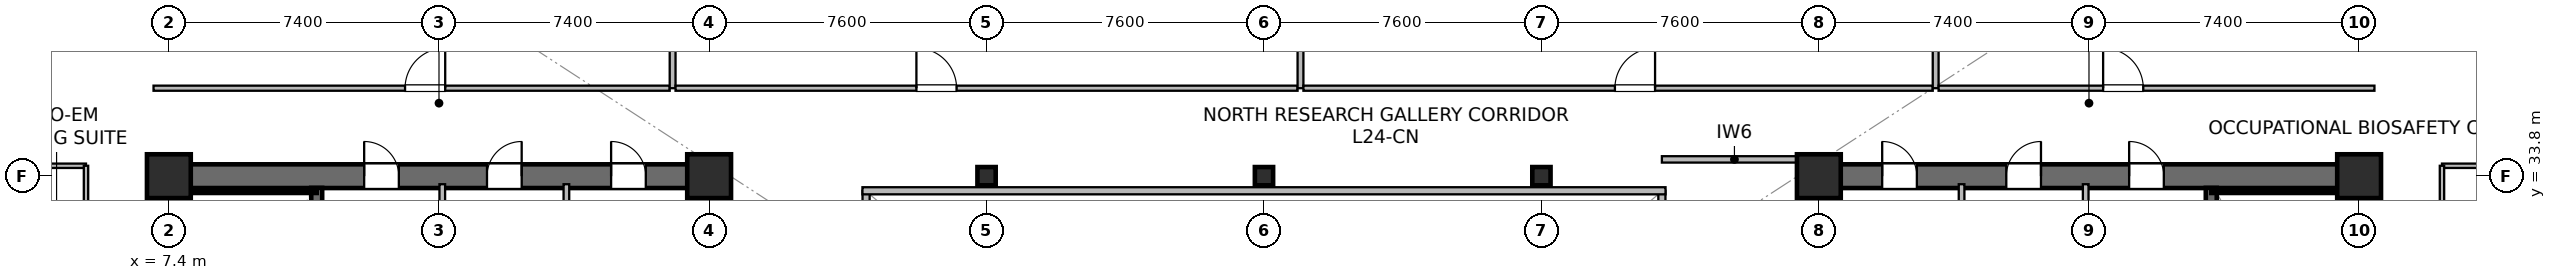
"""IFC4 building model, lengths in metres.
Left out: names, types, materials, properties, quantities, classifications, styles, units other than length and angle.
Written with IfcOpenShell. Run it as: python <this file> out.ifc"""

import sys

from ifc_helpers import new_model, si_unit, direction, frame, frame_2d, origin, origin_2d, place, context, subcontext, project, spatial, rectangle, hollow_rectangle, extrude, source, transform, mapped, element, fill, save


model = new_model("IFC4")
c1 = context("Model", 3, precision=1e-05, world=origin(), true_north=direction((0.0, 1.0)))
c2 = subcontext(c1, "Body", "Model", "MODEL_VIEW")
j1 = project(units=[si_unit("LENGTHUNIT", "METRE"), si_unit("PLANEANGLEUNIT", "RADIAN")], contexts=[c1])
p1 = place(None, origin())
s1 = spatial("IfcSite", under=j1, at=p1, CompositionType="ELEMENT")
p2 = place(p1, origin())
s2 = spatial("IfcBuilding", under=s1, at=p2, CompositionType="ELEMENT")
p3 = place(p2, frame((0.0, 0.0, 100.3)))
s3 = spatial("IfcBuildingStorey", under=s2, at=p3, CompositionType="ELEMENT", Elevation=100.3)
p4 = place(p3, frame((7.075, 33.8, 0.0), z_axis=(0.0, 0.0, 1.0), x_axis=(1.0, 0.0, 0.0)))
e1 = element("IfcWall", 1, at=p4, inside=s3, PredefinedType="SHEAR", context=c2, shape_type="SweptSolid", body=[
    extrude(rectangle(XDim=15.45, YDim=0.65, at=frame_2d((7.725, 0.0))), origin(), (0.0, 0.0, 1.0), 4.49),
])
p5 = place(p4, frame((5.675, 0.0, 0.0)))
e2 = element("IfcOpeningElement", 2, at=p5, cuts=e1, PredefinedType="OPENING", context=c2, shape_type="SweptSolid", body=[
    extrude(rectangle(XDim=0.95, YDim=2.15, at=frame_2d((0.475, 1.075))), frame((0.0, 0.335, 0.0), z_axis=(0.0, -1.0, 0.0), x_axis=(1.0, 0.0, 0.0)), (0.0, 0.0, 1.0), 0.67),
])
p6 = place(p4, frame((9.04, 0.0, 0.0)))
e3 = element("IfcOpeningElement", 3, at=p6, cuts=e1, PredefinedType="OPENING", context=c2, shape_type="SweptSolid", body=[
    extrude(rectangle(XDim=0.95, YDim=2.15, at=frame_2d((0.475, 1.075))), frame((0.0, 0.335, 0.0), z_axis=(0.0, -1.0, 0.0), x_axis=(1.0, 0.0, 0.0)), (0.0, 0.0, 1.0), 0.67),
])
p7 = place(p4, frame((12.44, 0.0, 0.0)))
e4 = element("IfcOpeningElement", 4, at=p7, cuts=e1, PredefinedType="OPENING", context=c2, shape_type="SweptSolid", body=[
    extrude(rectangle(XDim=0.95, YDim=2.15, at=frame_2d((0.475, 1.075))), frame((0.0, 0.335, 0.0), z_axis=(0.0, -1.0, 0.0), x_axis=(1.0, 0.0, 0.0)), (0.0, 0.0, 1.0), 0.67),
])
p8 = place(p3, frame((7.4, 15.125, 0.0), z_axis=(0.0, 0.0, 1.0), x_axis=(0.0, 1.0, 0.0)))
e5 = element("IfcWall", 5, at=p8, inside=s3, PredefinedType="SHEAR", context=c2, shape_type="SweptSolid", body=[
    extrude(rectangle(XDim=18.35, YDim=0.65, at=frame_2d((9.175, 0.0))), origin(), (0.0, 0.0, 1.0), 4.49),
])
p9 = place(p3, frame((22.2, 15.125, 0.0), z_axis=(0.0, 0.0, 1.0), x_axis=(0.0, 1.0, 0.0)))
e6 = element("IfcWall", 6, at=p9, inside=s3, PredefinedType="SHEAR", context=c2, shape_type="SweptSolid", body=[
    extrude(rectangle(XDim=18.35, YDim=0.65, at=frame_2d((9.175, 0.0))), origin(), (0.0, 0.0, 1.0), 4.49),
])
p10 = place(p9, frame((3.425, 0.0, 0.0)))
e7 = element("IfcOpeningElement", 7, at=p10, cuts=e6, PredefinedType="OPENING", context=c2, shape_type="SweptSolid", body=[
    extrude(rectangle(XDim=1.42, YDim=2.2, at=frame_2d((0.71, 1.1))), frame((0.0, 0.335, 0.0), z_axis=(0.0, -1.0, 0.0), x_axis=(1.0, 0.0, 0.0)), (0.0, 0.0, 1.0), 0.67),
])
p11 = place(p3, frame((11.45, 24.85, 0.0), z_axis=(0.0, 0.0, 1.0), x_axis=(0.0, 1.0, 0.0)))
e8 = element("IfcWall", 8, at=p11, inside=s3, PredefinedType="SHEAR", context=c2, shape_type="SweptSolid", body=[
    extrude(rectangle(XDim=8.63, YDim=0.3, at=frame_2d((4.315, 0.0))), origin(), (0.0, 0.0, 1.0), 4.49),
])
p12 = place(p11, frame((0.42, 0.0, 0.0)))
e9 = element("IfcOpeningElement", 9, at=p12, cuts=e8, PredefinedType="OPENING", context=c2, shape_type="SweptSolid", body=[
    extrude(rectangle(XDim=1.1, YDim=2.15, at=frame_2d((0.55, 1.075))), frame((0.0, 0.16, 0.0), z_axis=(0.0, -1.0, 0.0), x_axis=(1.0, 0.0, 0.0)), (0.0, 0.0, 1.0), 0.32),
])
p13 = place(p3, frame((7.73, 33.4, 0.0), z_axis=(0.0, 0.0, 1.0), x_axis=(1.0, 0.0, 0.0)))
e10 = element("IfcWall", 10, at=p13, inside=s3, PredefinedType="SOLIDWALL", context=c2, shape_type="SweptSolid", body=[
    extrude(rectangle(XDim=3.72, YDim=0.12, at=frame_2d((1.86, 0.0))), origin(), (0.0, 0.0, 1.0), 4.49),
])
p14 = place(p3, frame((7.73, 25.0, 0.0), z_axis=(0.0, 0.0, 1.0), x_axis=(0.0, 1.0, 0.0)))
e11 = element("IfcWall", 11, at=p14, inside=s3, PredefinedType="SOLIDWALL", context=c2, shape_type="SweptSolid", body=[
    extrude(rectangle(XDim=8.32, YDim=0.12, at=frame_2d((4.16, 0.0))), origin(), (0.0, 0.0, 1.0), 4.49),
])
p15 = place(p3, frame((52.275, 33.8, 0.0), z_axis=(0.0, 0.0, 1.0), x_axis=(1.0, 0.0, 0.0)))
e12 = element("IfcWall", 12, at=p15, inside=s3, PredefinedType="SHEAR", context=c2, shape_type="SweptSolid", body=[
    extrude(rectangle(XDim=15.45, YDim=0.65, at=frame_2d((7.725, 0.0))), origin(), (0.0, 0.0, 1.0), 4.49),
])
p16 = place(p15, frame((8.825, 0.0, 0.0)))
e13 = element("IfcOpeningElement", 13, at=p16, cuts=e12, PredefinedType="OPENING", context=c2, shape_type="SweptSolid", body=[
    extrude(rectangle(XDim=0.95, YDim=2.15, at=frame_2d((0.475, 1.075))), frame((0.0, 0.335, 0.0), z_axis=(0.0, -1.0, 0.0), x_axis=(1.0, 0.0, 0.0)), (0.0, 0.0, 1.0), 0.67),
])
p17 = place(p15, frame((5.46, 0.0, 0.0)))
e14 = element("IfcOpeningElement", 14, at=p17, cuts=e12, PredefinedType="OPENING", context=c2, shape_type="SweptSolid", body=[
    extrude(rectangle(XDim=0.95, YDim=2.15, at=frame_2d((0.475, 1.075))), frame((0.0, 0.335, 0.0), z_axis=(0.0, -1.0, 0.0), x_axis=(1.0, 0.0, 0.0)), (0.0, 0.0, 1.0), 0.67),
])
p18 = place(p15, frame((2.06, 0.0, 0.0)))
e15 = element("IfcOpeningElement", 15, at=p18, cuts=e12, PredefinedType="OPENING", context=c2, shape_type="SweptSolid", body=[
    extrude(rectangle(XDim=0.95, YDim=2.15, at=frame_2d((0.475, 1.075))), frame((0.0, 0.335, 0.0), z_axis=(0.0, -1.0, 0.0), x_axis=(1.0, 0.0, 0.0)), (0.0, 0.0, 1.0), 0.67),
])
p19 = place(p3, frame((52.6, 15.125, 0.0), z_axis=(0.0, 0.0, 1.0), x_axis=(0.0, 1.0, 0.0)))
e16 = element("IfcWall", 16, at=p19, inside=s3, PredefinedType="SHEAR", context=c2, shape_type="SweptSolid", body=[
    extrude(rectangle(XDim=18.35, YDim=0.65, at=frame_2d((9.175, 0.0))), origin(), (0.0, 0.0, 1.0), 4.49),
])
p20 = place(p19, frame((3.425, 0.0, 0.0)))
e17 = element("IfcOpeningElement", 17, at=p20, cuts=e16, PredefinedType="OPENING", context=c2, shape_type="SweptSolid", body=[
    extrude(rectangle(XDim=1.42, YDim=2.2, at=frame_2d((0.71, 1.1))), frame((0.0, 0.335, 0.0), z_axis=(0.0, -1.0, 0.0), x_axis=(1.0, 0.0, 0.0)), (0.0, 0.0, 1.0), 0.67),
])
p21 = place(p3, frame((67.4, 15.125, 0.0), z_axis=(0.0, 0.0, 1.0), x_axis=(0.0, 1.0, 0.0)))
e18 = element("IfcWall", 18, at=p21, inside=s3, PredefinedType="SHEAR", context=c2, shape_type="SweptSolid", body=[
    extrude(rectangle(XDim=18.35, YDim=0.65, at=frame_2d((9.175, 0.0))), origin(), (0.0, 0.0, 1.0), 4.49),
])
p22 = place(p3, frame((63.35, 24.85, 0.0), z_axis=(0.0, 0.0, 1.0), x_axis=(0.0, 1.0, 0.0)))
e19 = element("IfcWall", 19, at=p22, inside=s3, PredefinedType="SHEAR", context=c2, shape_type="SweptSolid", body=[
    extrude(rectangle(XDim=8.63, YDim=0.3, at=frame_2d((4.315, 0.0))), origin(), (0.0, 0.0, 1.0), 4.49),
])
p23 = place(p22, frame((0.42, 0.0, 0.0)))
e20 = element("IfcOpeningElement", 20, at=p23, cuts=e19, PredefinedType="OPENING", context=c2, shape_type="SweptSolid", body=[
    extrude(rectangle(XDim=1.1, YDim=2.15, at=frame_2d((0.55, 1.075))), frame((0.0, 0.16, 0.0), z_axis=(0.0, -1.0, 0.0), x_axis=(1.0, 0.0, 0.0)), (0.0, 0.0, 1.0), 0.32),
])
p24 = place(p3, frame((63.35, 33.4, 0.0), z_axis=(0.0, 0.0, 1.0), x_axis=(1.0, 0.0, 0.0)))
e21 = element("IfcWall", 21, at=p24, inside=s3, PredefinedType="SOLIDWALL", context=c2, shape_type="SweptSolid", body=[
    extrude(rectangle(XDim=3.72, YDim=0.12, at=frame_2d((1.86, 0.0))), origin(), (0.0, 0.0, 1.0), 4.49),
])
p25 = place(p3, frame((67.07, 25.0, 0.0), z_axis=(0.0, 0.0, 1.0), x_axis=(0.0, 1.0, 0.0)))
e22 = element("IfcWall", 22, at=p25, inside=s3, PredefinedType="SOLIDWALL", context=c2, shape_type="SweptSolid", body=[
    extrude(rectangle(XDim=8.32, YDim=0.12, at=frame_2d((4.16, 0.0))), origin(), (0.0, 0.0, 1.0), 4.49),
])
m1 = source(origin(), c2, "Body", "SweptSolid", [
    extrude(rectangle(XDim=1.2, YDim=1.2, at=origin_2d()), origin(), (0.0, 0.0, 1.0), 4.8),
])
for number, where, z_axis, x_axis in (
    (23, (7.4, 33.8, 0.0), (0.0, 0.0, 1.0), (1.0, 0.0, 0.0)),
    (24, (22.2, 33.8, 0.0), (0.0, 0.0, 1.0), (1.0, 0.0, 0.0)),
    (25, (52.6, 33.8, 0.0), (0.0, 0.0, 1.0), (1.0, 0.0, 0.0)),
    (26, (67.4, 33.8, 0.0), (0.0, 0.0, 1.0), (1.0, 0.0, 0.0)),
):
    element("IfcColumn", number, at=place(p3, frame(where, z_axis=z_axis, x_axis=x_axis)), inside=s3, PredefinedType="COLUMN", context=c2, shape_type="MappedRepresentation", body=[
        mapped(m1, transform((0.0, 0.0, 0.0), scale=1.0)),
    ])
m2 = source(origin(), c2, "Body", "SweptSolid", [
    extrude(hollow_rectangle(XDim=0.5, YDim=0.5, WallThickness=0.022, at=origin_2d()), origin(), (0.0, 0.0, 1.0), 4.8),
])
for number, where, z_axis, x_axis in (
    (27, (29.8, 33.8, 0.0), (0.0, 0.0, 1.0), (1.0, 0.0, 0.0)),
    (28, (37.4, 33.8, 0.0), (0.0, 0.0, 1.0), (1.0, 0.0, 0.0)),
    (29, (45.0, 33.8, 0.0), (0.0, 0.0, 1.0), (1.0, 0.0, 0.0)),
):
    element("IfcColumn", number, at=place(p3, frame(where, z_axis=z_axis, x_axis=x_axis)), inside=s3, PredefinedType="COLUMN", context=c2, shape_type="MappedRepresentation", body=[
        mapped(m2, transform((0.0, 0.0, 0.0), scale=1.0)),
    ])
p26 = place(p3, frame((14.89, 29.65, 0.0), z_axis=(0.0, 0.0, 1.0), x_axis=(0.0, 1.0, 0.0)))
e30 = element("IfcWall", 30, at=p26, inside=s3, PredefinedType="PLUMBINGWALL", context=c2, shape_type="SweptSolid", body=[
    extrude(rectangle(XDim=3.93, YDim=0.155, at=frame_2d((1.965, 0.0))), origin(), (0.0, 0.0, 1.0), 3.825),
])
p27 = place(p3, frame((18.29, 29.65, 0.0), z_axis=(0.0, 0.0, 1.0), x_axis=(0.0, 1.0, 0.0)))
e31 = element("IfcWall", 31, at=p27, inside=s3, PredefinedType="PLUMBINGWALL", context=c2, shape_type="SweptSolid", body=[
    extrude(rectangle(XDim=3.93, YDim=0.155, at=frame_2d((1.965, 0.0))), origin(), (0.0, 0.0, 1.0), 4.49),
])
p28 = place(p3, frame((59.91, 29.65, 0.0), z_axis=(0.0, 0.0, 1.0), x_axis=(0.0, 1.0, 0.0)))
e32 = element("IfcWall", 32, at=p28, inside=s3, PredefinedType="PLUMBINGWALL", context=c2, shape_type="SweptSolid", body=[
    extrude(rectangle(XDim=3.93, YDim=0.155, at=frame_2d((1.965, 0.0))), origin(), (0.0, 0.0, 1.0), 3.825),
])
p29 = place(p3, frame((56.51, 29.65, 0.0), z_axis=(0.0, 0.0, 1.0), x_axis=(0.0, 1.0, 0.0)))
e33 = element("IfcWall", 33, at=p29, inside=s3, PredefinedType="PLUMBINGWALL", context=c2, shape_type="SweptSolid", body=[
    extrude(rectangle(XDim=3.93, YDim=0.155, at=frame_2d((1.965, 0.0))), origin(), (0.0, 0.0, 1.0), 4.49),
])
p30 = place(p3, frame((48.3, 34.26, 0.0), z_axis=(0.0, 0.0, 1.0), x_axis=(1.0, 0.0, 0.0)))
e34 = element("IfcWall", 34, at=p30, inside=s3, PredefinedType="PARTITIONING", context=c2, shape_type="SweptSolid", body=[
    extrude(rectangle(XDim=3.975, YDim=0.175, at=frame_2d((1.987, 0.0))), origin(), (0.0, 0.0, 1.0), 4.175),
])
p31 = place(p3, frame((26.5, 15.2, 0.0), z_axis=(0.0, 0.0, 1.0), x_axis=(0.0, 1.0, 0.0)))
e35 = element("IfcWall", 35, at=p31, inside=s3, PredefinedType="SOLIDWALL", context=c2, shape_type="SweptSolid", body=[
    extrude(rectangle(XDim=18.2, YDim=0.195, at=frame_2d((9.1, 0.0))), origin(), (0.0, 0.0, 1.0), 4.49),
])
p32 = place(p31, frame((1.8, 0.0, 0.9)))
e36 = element("IfcOpeningElement", 36, at=p32, cuts=e35, PredefinedType="OPENING", context=c2, shape_type="SweptSolid", body=[
    extrude(rectangle(XDim=1.5, YDim=1.4, at=frame_2d((0.75, 0.7))), frame((0.0, 0.107, 0.0), z_axis=(0.0, -1.0, 0.0), x_axis=(1.0, 0.0, 0.0)), (0.0, 0.0, 1.0), 0.215),
])
p33 = place(p31, frame((13.2, 0.0, 0.9)))
e37 = element("IfcOpeningElement", 37, at=p33, cuts=e35, PredefinedType="OPENING", context=c2, shape_type="SweptSolid", body=[
    extrude(rectangle(XDim=1.5, YDim=1.4, at=frame_2d((0.75, 0.7))), frame((0.0, 0.107, 0.0), z_axis=(0.0, -1.0, 0.0), x_axis=(1.0, 0.0, 0.0)), (0.0, 0.0, 1.0), 0.215),
])
p34 = place(p3, frame((48.3, 15.2, 0.0), z_axis=(0.0, 0.0, 1.0), x_axis=(0.0, 1.0, 0.0)))
e38 = element("IfcWall", 38, at=p34, inside=s3, PredefinedType="SOLIDWALL", context=c2, shape_type="SweptSolid", body=[
    extrude(rectangle(XDim=18.2, YDim=0.195, at=frame_2d((9.1, 0.0))), origin(), (0.0, 0.0, 1.0), 4.49),
])
p35 = place(p34, frame((1.8, 0.0, 0.9)))
e39 = element("IfcOpeningElement", 39, at=p35, cuts=e38, PredefinedType="OPENING", context=c2, shape_type="SweptSolid", body=[
    extrude(rectangle(XDim=1.5, YDim=1.4, at=frame_2d((0.75, 0.7))), frame((0.0, 0.107, 0.0), z_axis=(0.0, -1.0, 0.0), x_axis=(1.0, 0.0, 0.0)), (0.0, 0.0, 1.0), 0.215),
])
p36 = place(p34, frame((13.2, 0.0, 0.9)))
e40 = element("IfcOpeningElement", 40, at=p36, cuts=e38, PredefinedType="OPENING", context=c2, shape_type="SweptSolid", body=[
    extrude(rectangle(XDim=1.5, YDim=1.4, at=frame_2d((0.75, 0.7))), frame((0.0, 0.107, 0.0), z_axis=(0.0, -1.0, 0.0), x_axis=(1.0, 0.0, 0.0)), (0.0, 0.0, 1.0), 0.215),
])
p37 = place(p3, frame((26.4, 33.4, 0.0), z_axis=(0.0, 0.0, 1.0), x_axis=(1.0, 0.0, 0.0)))
e41 = element("IfcWall", 41, at=p37, inside=s3, PredefinedType="SOLIDWALL", context=c2, shape_type="SweptSolid", body=[
    extrude(rectangle(XDim=22.0, YDim=0.195, at=frame_2d((11.0, 0.0))), origin(), (0.0, 0.0, 1.0), 4.49),
])
p38 = place(p3, frame((6.98, 36.21, 0.0), z_axis=(0.0, 0.0, 1.0), x_axis=(1.0, 0.0, 0.0)))
e42 = element("IfcWall", 42, at=p38, inside=s3, PredefinedType="PARTITIONING", context=c2, shape_type="SweptSolid", body=[
    extrude(rectangle(XDim=14.14, YDim=0.14, at=frame_2d((7.07, 0.0))), origin(), (0.0, 0.0, 1.0), 3.825),
])
p39 = place(p38, frame((6.89, 0.0, 0.0)))
e43 = element("IfcOpeningElement", 43, at=p39, cuts=e42, PredefinedType="OPENING", context=c2, shape_type="SweptSolid", body=[
    extrude(rectangle(XDim=1.1, YDim=2.18, at=frame_2d((0.55, 1.09))), frame((0.0, 0.08, 0.0), z_axis=(0.0, -1.0, 0.0), x_axis=(1.0, 0.0, 0.0)), (0.0, 0.0, 1.0), 0.16),
])
p40 = place(p3, frame((21.2, 36.21, 0.0), z_axis=(0.0, 0.0, 1.0), x_axis=(0.0, 1.0, 0.0)))
e44 = element("IfcWall", 44, at=p40, inside=s3, PredefinedType="PARTITIONING", context=c2, shape_type="SweptSolid", body=[
    extrude(rectangle(XDim=10.98, YDim=0.16, at=frame_2d((5.49, 0.0))), origin(), (0.0, 0.0, 1.0), 3.775),
])
p41 = place(p3, frame((21.28, 36.21, 0.0), z_axis=(0.0, 0.0, 1.0), x_axis=(1.0, 0.0, 0.0)))
e45 = element("IfcWall", 45, at=p41, inside=s3, PredefinedType="PARTITIONING", context=c2, shape_type="SweptSolid", body=[
    extrude(rectangle(XDim=17.04, YDim=0.14, at=frame_2d((8.52, 0.0))), origin(), (0.0, 0.0, 1.0), 3.825),
])
p42 = place(p41, frame((6.598, 0.0, 0.0)))
e46 = element("IfcOpeningElement", 46, at=p42, cuts=e45, PredefinedType="OPENING", context=c2, shape_type="SweptSolid", body=[
    extrude(rectangle(XDim=1.1, YDim=2.18, at=frame_2d((0.55, 1.09))), frame((0.0, 0.08, 0.0), z_axis=(0.0, -1.0, 0.0), x_axis=(1.0, 0.0, 0.0)), (0.0, 0.0, 1.0), 0.16),
])
p43 = place(p3, frame((38.4, 36.21, 0.0), z_axis=(0.0, 0.0, 1.0), x_axis=(0.0, 1.0, 0.0)))
e47 = element("IfcWall", 47, at=p43, inside=s3, PredefinedType="PARTITIONING", context=c2, shape_type="SweptSolid", body=[
    extrude(rectangle(XDim=9.78, YDim=0.16, at=frame_2d((4.89, 0.0))), origin(), (0.0, 0.0, 1.0), 3.775),
])
p44 = place(p3, frame((38.48, 36.21, 0.0), z_axis=(0.0, 0.0, 1.0), x_axis=(1.0, 0.0, 0.0)))
e48 = element("IfcWall", 48, at=p44, inside=s3, PredefinedType="PARTITIONING", context=c2, shape_type="SweptSolid", body=[
    extrude(rectangle(XDim=17.24, YDim=0.14, at=frame_2d((8.62, 0.0))), origin(), (0.0, 0.0, 1.0), 3.825),
])
p45 = place(p44, frame((8.533, 0.0, 0.0)))
e49 = element("IfcOpeningElement", 49, at=p45, cuts=e48, PredefinedType="OPENING", context=c2, shape_type="SweptSolid", body=[
    extrude(rectangle(XDim=1.1, YDim=2.18, at=frame_2d((0.55, 1.09))), frame((0.0, 0.08, 0.0), z_axis=(0.0, -1.0, 0.0), x_axis=(1.0, 0.0, 0.0)), (0.0, 0.0, 1.0), 0.16),
])
p46 = place(p3, frame((55.8, 36.21, 0.0), z_axis=(0.0, 0.0, 1.0), x_axis=(0.0, 1.0, 0.0)))
e50 = element("IfcWall", 50, at=p46, inside=s3, PredefinedType="PARTITIONING", context=c2, shape_type="SweptSolid", body=[
    extrude(rectangle(XDim=10.98, YDim=0.16, at=frame_2d((5.49, 0.0))), origin(), (0.0, 0.0, 1.0), 3.775),
])
p47 = place(p3, frame((55.88, 36.21, 0.0), z_axis=(0.0, 0.0, 1.0), x_axis=(1.0, 0.0, 0.0)))
e51 = element("IfcWall", 51, at=p47, inside=s3, PredefinedType="PARTITIONING", context=c2, shape_type="SweptSolid", body=[
    extrude(rectangle(XDim=11.94, YDim=0.14, at=frame_2d((5.97, 0.0))), origin(), (0.0, 0.0, 1.0), 3.825),
])
p48 = place(p47, frame((4.507, 0.0, 0.0)))
e52 = element("IfcOpeningElement", 52, at=p48, cuts=e51, PredefinedType="OPENING", context=c2, shape_type="SweptSolid", body=[
    extrude(rectangle(XDim=1.1, YDim=2.18, at=frame_2d((0.55, 1.09))), frame((0.0, 0.08, 0.0), z_axis=(0.0, -1.0, 0.0), x_axis=(1.0, 0.0, 0.0)), (0.0, 0.0, 1.0), 0.16),
])
p49 = place(p3, frame((2.11, 34.085, 0.0), z_axis=(0.0, 0.0, 1.0), x_axis=(1.0, 0.0, 0.0)))
e53 = element("IfcWall", 53, at=p49, inside=s3, PredefinedType="PARTITIONING", context=c2, shape_type="SweptSolid", body=[
    extrude(rectangle(XDim=3.02, YDim=0.12, at=frame_2d((1.51, 0.0))), origin(), (0.0, 0.0, 1.0), 4.49),
])
p50 = place(p3, frame((5.13, 26.26, 0.0), z_axis=(0.0, 0.0, 1.0), x_axis=(0.0, 1.0, 0.0)))
e54 = element("IfcWall", 54, at=p50, inside=s3, PredefinedType="PARTITIONING", context=c2, shape_type="SweptSolid", body=[
    extrude(rectangle(XDim=7.825, YDim=0.12, at=frame_2d((3.913, 0.0))), origin(), (0.0, 0.0, 1.0), 4.49),
])
p51 = place(p50, frame((3.462, 0.0, 0.0)))
e55 = element("IfcOpeningElement", 55, at=p51, cuts=e54, PredefinedType="OPENING", context=c2, shape_type="SweptSolid", body=[
    extrude(rectangle(XDim=0.9, YDim=2.1, at=frame_2d((0.45, 1.05))), frame((0.0, 0.07, 0.0), z_axis=(0.0, -1.0, 0.0), x_axis=(1.0, 0.0, 0.0)), (0.0, 0.0, 1.0), 0.14),
])
p52 = place(p3, frame((69.67, 34.085, 0.0), z_axis=(0.0, 0.0, 1.0), x_axis=(1.0, 0.0, 0.0)))
e56 = element("IfcWall", 56, at=p52, inside=s3, PredefinedType="PARTITIONING", context=c2, shape_type="SweptSolid", body=[
    extrude(rectangle(XDim=3.02, YDim=0.12, at=frame_2d((1.51, 0.0))), origin(), (0.0, 0.0, 1.0), 4.49),
])
p53 = place(p3, frame((69.67, 29.06, 0.0), z_axis=(0.0, 0.0, 1.0), x_axis=(0.0, 1.0, 0.0)))
e57 = element("IfcWall", 57, at=p53, inside=s3, PredefinedType="PARTITIONING", context=c2, shape_type="SweptSolid", body=[
    extrude(rectangle(XDim=5.025, YDim=0.12, at=frame_2d((2.512, 0.0))), origin(), (0.0, 0.0, 1.0), 4.49),
])
p54 = place(p53, frame((2.062, 0.0, 0.0)))
e58 = element("IfcOpeningElement", 58, at=p54, cuts=e57, PredefinedType="OPENING", context=c2, shape_type="SweptSolid", body=[
    extrude(rectangle(XDim=0.9, YDim=2.1, at=frame_2d((0.45, 1.05))), frame((0.0, 0.07, 0.0), z_axis=(0.0, -1.0, 0.0), x_axis=(1.0, 0.0, 0.0)), (0.0, 0.0, 1.0), 0.14),
])
m3 = source(origin(), c2, "Body", "SweptSolid", [
    extrude(rectangle(XDim=0.95, YDim=2.15, at=frame_2d((0.475, 1.075))), frame((0.0, 0.025, 0.0), z_axis=(0.0, -1.0, 0.0), x_axis=(1.0, 0.0, 0.0)), (0.0, 0.0, 1.0), 0.05),
])
p55 = place(p5, origin())
e59 = element("IfcDoor", 59, at=p55, inside=s3, OperationType="SINGLE_SWING_LEFT", PredefinedType="DOOR", context=c2, shape_type="MappedRepresentation", body=[
    mapped(m3, transform((0.0, 0.0, 0.0), scale=1.0)),
])
fill(e2, e59)
p56 = place(p6, origin())
e60 = element("IfcDoor", 60, at=p56, inside=s3, OperationType="SINGLE_SWING_RIGHT", PredefinedType="DOOR", context=c2, shape_type="MappedRepresentation", body=[
    mapped(m3, transform((0.0, 0.0, 0.0), scale=1.0)),
])
fill(e3, e60)
p57 = place(p7, origin())
e61 = element("IfcDoor", 61, at=p57, inside=s3, OperationType="SINGLE_SWING_LEFT", PredefinedType="DOOR", context=c2, shape_type="MappedRepresentation", body=[
    mapped(m3, transform((0.0, 0.0, 0.0), scale=1.0)),
])
fill(e4, e61)
p58 = place(p16, origin())
e62 = element("IfcDoor", 62, at=p58, inside=s3, OperationType="SINGLE_SWING_LEFT", PredefinedType="DOOR", context=c2, shape_type="MappedRepresentation", body=[
    mapped(m3, transform((0.0, 0.0, 0.0), scale=1.0)),
])
fill(e13, e62)
p59 = place(p17, origin())
e63 = element("IfcDoor", 63, at=p59, inside=s3, OperationType="SINGLE_SWING_RIGHT", PredefinedType="DOOR", context=c2, shape_type="MappedRepresentation", body=[
    mapped(m3, transform((0.0, 0.0, 0.0), scale=1.0)),
])
fill(e14, e63)
p60 = place(p18, origin())
e64 = element("IfcDoor", 64, at=p60, inside=s3, OperationType="SINGLE_SWING_LEFT", PredefinedType="DOOR", context=c2, shape_type="MappedRepresentation", body=[
    mapped(m3, transform((0.0, 0.0, 0.0), scale=1.0)),
])
fill(e15, e64)
m4 = source(origin(), c2, "Body", "SweptSolid", [
    extrude(rectangle(XDim=1.1, YDim=2.18, at=frame_2d((0.55, 1.09))), frame((0.0, 0.025, 0.0), z_axis=(0.0, -1.0, 0.0), x_axis=(1.0, 0.0, 0.0)), (0.0, 0.0, 1.0), 0.05),
])
p61 = place(p39, origin())
e65 = element("IfcDoor", 65, at=p61, inside=s3, OperationType="SINGLE_SWING_RIGHT", PredefinedType="DOOR", context=c2, shape_type="MappedRepresentation", body=[
    mapped(m4, transform((0.0, 0.0, 0.0), scale=1.0)),
])
fill(e43, e65)
p62 = place(p42, origin())
e66 = element("IfcDoor", 66, at=p62, inside=s3, OperationType="SINGLE_SWING_LEFT", PredefinedType="DOOR", context=c2, shape_type="MappedRepresentation", body=[
    mapped(m4, transform((0.0, 0.0, 0.0), scale=1.0)),
])
fill(e46, e66)
p63 = place(p45, origin())
e67 = element("IfcDoor", 67, at=p63, inside=s3, OperationType="SINGLE_SWING_RIGHT", PredefinedType="DOOR", context=c2, shape_type="MappedRepresentation", body=[
    mapped(m4, transform((0.0, 0.0, 0.0), scale=1.0)),
])
fill(e49, e67)
p64 = place(p48, origin())
e68 = element("IfcDoor", 68, at=p64, inside=s3, OperationType="SINGLE_SWING_LEFT", PredefinedType="DOOR", context=c2, shape_type="MappedRepresentation", body=[
    mapped(m4, transform((0.0, 0.0, 0.0), scale=1.0)),
])
fill(e52, e68)
save(model, sys.argv[1])
